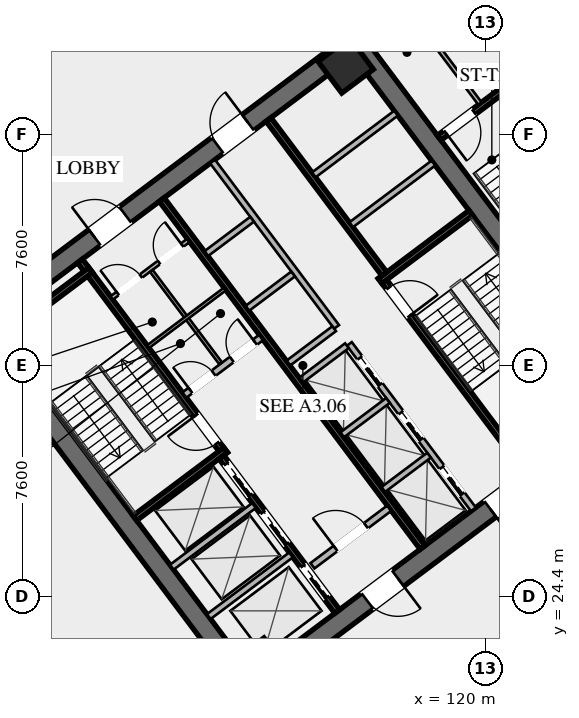
"""IFC4 building model, lengths in metres.
Left out: names, types, materials, properties, quantities, classifications, styles, units other than length and angle.
Written with IfcOpenShell. Run it as: python <this file> out.ifc"""

import sys

from ifc_helpers import new_model, si_unit, direction, frame, frame_2d, origin, origin_2d, place, context, subcontext, project, spatial, rectangle, hollow_rectangle, extrude, element, fill, save


model = new_model("IFC4")
c1 = context("Model", 3, precision=1e-05, world=origin(), true_north=direction((0.0, 1.0)))
c2 = subcontext(c1, "Body", "Model", "MODEL_VIEW")
j1 = project(units=[si_unit("LENGTHUNIT", "METRE"), si_unit("PLANEANGLEUNIT", "RADIAN")], contexts=[c1])
p1 = place(None, origin())
s1 = spatial("IfcSite", under=j1, at=p1, CompositionType="ELEMENT")
p2 = place(p1, origin())
s2 = spatial("IfcBuilding", under=s1, at=p2, CompositionType="ELEMENT")
p3 = place(p2, frame((0.0, 0.0, 15.6)))
s3 = spatial("IfcBuildingStorey", under=s2, at=p3, CompositionType="ELEMENT", Elevation=15.6)
for number, where, z_axis, x_axis in (
    (1, (112.476, 21.107, 0.0), (0.0, 0.0, 1.0), (-0.6, 0.8, 0.0)),
    (2, (115.524, 42.893, 0.0), (0.0, 0.0, 1.0), (0.6, -0.8, 0.0)),
):
    element("IfcWall", number, at=place(p3, frame(where, z_axis=z_axis, x_axis=x_axis)), inside=s3, PredefinedType="SHEAR", context=c2, shape_type="SweptSolid", body=[
        extrude(rectangle(XDim=15.6, YDim=0.65, at=frame_2d((7.8, 0.0))), origin(), (0.0, 0.0, 1.0), 4.2),
    ])
p4 = place(p3, frame((124.429, 30.478, 0.0), z_axis=(0.0, 0.0, 1.0), x_axis=(-0.799998028465, -0.600002628705, 0.0)))
e3 = element("IfcWall", 3, at=p4, inside=s3, PredefinedType="SHEAR", context=c2, shape_type="SweptSolid", body=[
    extrude(rectangle(XDim=14.86, YDim=0.65, at=frame_2d((7.43, 0.0))), origin(), (0.0, 0.0, 1.0), 4.2),
])
p5 = place(p4, frame((9.13, 0.0, 0.0)))
e4 = element("IfcOpeningElement", 4, at=p5, cuts=e3, PredefinedType="OPENING", context=c2, shape_type="SweptSolid", body=[
    extrude(rectangle(XDim=1.25, YDim=2.25, at=frame_2d((0.625, 1.125))), frame((0.0, 0.335, 0.0), z_axis=(0.0, -1.0, 0.0), x_axis=(1.0, 0.0, 0.0)), (0.0, 0.0, 1.0), 0.67),
])
p6 = place(p4, frame((4.08, 0.0, 0.0)))
e5 = element("IfcOpeningElement", 5, at=p6, cuts=e3, PredefinedType="OPENING", context=c2, shape_type="SweptSolid", body=[
    extrude(rectangle(XDim=1.25, YDim=2.25, at=frame_2d((0.625, 1.125))), frame((0.0, 0.335, 0.0), z_axis=(0.0, -1.0, 0.0), x_axis=(1.0, 0.0, 0.0)), (0.0, 0.0, 1.0), 0.67),
])
p7 = place(p3, frame((103.571, 33.522, 0.0), z_axis=(0.0, 0.0, 1.0), x_axis=(0.799998028465, 0.600002628705, 0.0)))
e6 = element("IfcWall", 6, at=p7, inside=s3, PredefinedType="SHEAR", context=c2, shape_type="SweptSolid", body=[
    extrude(rectangle(XDim=14.86, YDim=0.65, at=frame_2d((7.43, 0.0))), origin(), (0.0, 0.0, 1.0), 4.2),
])
p8 = place(p7, frame((4.48, 0.0, 0.0)))
e7 = element("IfcOpeningElement", 7, at=p8, cuts=e6, PredefinedType="OPENING", context=c2, shape_type="SweptSolid", body=[
    extrude(rectangle(XDim=1.25, YDim=2.25, at=frame_2d((0.625, 1.125))), frame((0.0, 0.335, 0.0), z_axis=(0.0, -1.0, 0.0), x_axis=(1.0, 0.0, 0.0)), (0.0, 0.0, 1.0), 0.67),
])
p9 = place(p7, frame((9.53, 0.0, 0.0)))
e8 = element("IfcOpeningElement", 8, at=p9, cuts=e6, PredefinedType="OPENING", context=c2, shape_type="SweptSolid", body=[
    extrude(rectangle(XDim=1.25, YDim=2.25, at=frame_2d((0.625, 1.125))), frame((0.0, 0.335, 0.0), z_axis=(0.0, -1.0, 0.0), x_axis=(1.0, 0.0, 0.0)), (0.0, 0.0, 1.0), 0.67),
])
p10 = place(p3, frame((115.41, 41.87, 0.0), z_axis=(0.0, 0.0, 1.0), x_axis=(0.799999996291, 0.600000004945, 0.0)))
e9 = element("IfcColumn", 9, at=p10, inside=s3, PredefinedType="COLUMN", context=c2, shape_type="SweptSolid", body=[
    extrude(hollow_rectangle(XDim=1.3, YDim=1.3, WallThickness=0.05, at=origin_2d()), origin(), (0.0, 0.0, 1.0), 3.9),
])
p11 = place(p3, frame((111.44, 29.08, 0.0), z_axis=(0.0, 0.0, 1.0), x_axis=(-0.600009827119, 0.799992629566, 0.0)))
e10 = element("IfcWall", 10, at=p11, inside=s3, PredefinedType="SHEAR", context=c2, shape_type="SweptSolid", body=[
    extrude(rectangle(XDim=7.95, YDim=0.2, at=frame_2d((3.975, 0.0))), origin(), (0.0, 0.0, 1.0), 3.9),
])
p12 = place(p11, frame((0.45, 0.0, 0.0)))
e11 = element("IfcOpeningElement", 11, at=p12, cuts=e10, PredefinedType="OPENING", context=c2, shape_type="SweptSolid", body=[
    extrude(rectangle(XDim=1.15, YDim=2.2, at=frame_2d((0.575, 1.1))), frame((0.0, 0.11, 0.0), z_axis=(0.0, -1.0, 0.0), x_axis=(1.0, 0.0, 0.0)), (0.0, 0.0, 1.0), 0.22),
])
for number, where, z_axis, x_axis in (
    (12, (108.476, 26.982, 0.0), (0.0, 0.0, 1.0), (0.8, 0.6, 0.0)),
    (13, (104.036, 32.902, 0.0), (0.0, 0.0, 1.0), (0.8, 0.6, 0.0)),
):
    element("IfcWall", number, at=place(p3, frame(where, z_axis=z_axis, x_axis=x_axis)), inside=s3, PredefinedType="SHEAR", context=c2, shape_type="SweptSolid", body=[
        extrude(rectangle(XDim=3.73, YDim=0.2, at=frame_2d((1.865, 0.0))), origin(), (0.0, 0.0, 1.0), 3.9),
    ])
p13 = place(p3, frame((116.56, 34.92, 0.0), z_axis=(0.0, 0.0, 1.0), x_axis=(0.600009827119, -0.799992629566, 0.0)))
e14 = element("IfcWall", 14, at=p13, inside=s3, PredefinedType="SHEAR", context=c2, shape_type="SweptSolid", body=[
    extrude(rectangle(XDim=7.95, YDim=0.2, at=frame_2d((3.975, 0.0))), origin(), (0.0, 0.0, 1.0), 3.9),
])
p14 = place(p13, frame((0.45, 0.0, 0.0)))
e15 = element("IfcOpeningElement", 15, at=p14, cuts=e14, PredefinedType="OPENING", context=c2, shape_type="SweptSolid", body=[
    extrude(rectangle(XDim=1.15, YDim=2.2, at=frame_2d((0.575, 1.1))), frame((0.0, 0.11, 0.0), z_axis=(0.0, -1.0, 0.0), x_axis=(1.0, 0.0, 0.0)), (0.0, 0.0, 1.0), 0.22),
])
p15 = place(p3, frame((116.54, 34.78, 0.0), z_axis=(0.0, 0.0, 1.0), x_axis=(0.799984290658, 0.600020945218, 0.0)))
e16 = element("IfcWall", 16, at=p15, inside=s3, PredefinedType="SHEAR", context=c2, shape_type="SweptSolid", body=[
    extrude(rectangle(XDim=3.73, YDim=0.2, at=frame_2d((1.865, 0.0))), origin(), (0.0, 0.0, 1.0), 3.9),
])
p16 = place(p3, frame((117.938, 26.016, 0.0), z_axis=(0.0, 0.0, 1.0), x_axis=(-0.600005463273, 0.799995902516, 0.0)))
e17 = element("IfcWall", 17, at=p16, inside=s3, PredefinedType="SHEAR", context=c2, shape_type="SweptSolid", body=[
    extrude(rectangle(XDim=14.3, YDim=0.2, at=frame_2d((7.15, 0.0))), origin(), (0.0, 0.0, 1.0), 3.9),
])
p17 = place(p3, frame((110.104, 31.028, 0.0), z_axis=(0.0, 0.0, 1.0), x_axis=(0.800018601094, 0.59997519774, 0.0)))
e18 = element("IfcWall", 18, at=p17, inside=s3, PredefinedType="SOLIDWALL", context=c2, shape_type="SweptSolid", body=[
    extrude(rectangle(XDim=3.15, YDim=0.22, at=frame_2d((1.575, 0.0))), origin(), (0.0, 0.0, 1.0), 2.943),
])
p18 = place(p17, frame((0.25, 0.0, 0.0)))
e19 = element("IfcOpeningElement", 19, at=p18, cuts=e18, PredefinedType="OPENING", context=c2, shape_type="SweptSolid", body=[
    extrude(rectangle(XDim=0.95, YDim=2.05, at=frame_2d((0.475, 1.025))), frame((0.0, 0.12, 0.0), z_axis=(0.0, -1.0, 0.0), x_axis=(1.0, 0.0, 0.0)), (0.0, 0.0, 1.0), 0.24),
])
p19 = place(p17, frame((1.95, 0.0, 0.0)))
e20 = element("IfcOpeningElement", 20, at=p19, cuts=e18, PredefinedType="OPENING", context=c2, shape_type="SweptSolid", body=[
    extrude(rectangle(XDim=0.95, YDim=2.05, at=frame_2d((0.475, 1.025))), frame((0.0, 0.12, 0.0), z_axis=(0.0, -1.0, 0.0), x_axis=(1.0, 0.0, 0.0)), (0.0, 0.0, 1.0), 0.24),
])
p20 = place(p3, frame((114.316, 25.412, 0.0), z_axis=(0.0, 0.0, 1.0), x_axis=(0.800018601094, 0.59997519774, 0.0)))
e21 = element("IfcWall", 21, at=p20, inside=s3, PredefinedType="SOLIDWALL", context=c2, shape_type="SweptSolid", body=[
    extrude(rectangle(XDim=3.15, YDim=0.22, at=frame_2d((1.575, 0.0))), origin(), (0.0, 0.0, 1.0), 2.943),
])
p21 = place(p20, frame((0.95, 0.0, 0.0)))
e22 = element("IfcOpeningElement", 22, at=p21, cuts=e21, PredefinedType="OPENING", context=c2, shape_type="SweptSolid", body=[
    extrude(rectangle(XDim=1.25, YDim=2.25, at=frame_2d((0.625, 1.125))), frame((0.0, 0.12, 0.0), z_axis=(0.0, -1.0, 0.0), x_axis=(1.0, 0.0, 0.0)), (0.0, 0.0, 1.0), 0.24),
])
p22 = place(p3, frame((115.13, 23.91, 0.0), z_axis=(0.0, 0.0, 1.0), x_axis=(-0.599975393228, 0.800018454488, 0.0)))
e23 = element("IfcWall", 23, at=p22, inside=s3, PredefinedType="SHEAR", context=c2, shape_type="SweptSolid", body=[
    extrude(rectangle(XDim=6.35, YDim=0.2, at=frame_2d((3.175, 0.0))), origin(), (0.0, 0.0, 1.0), 3.9),
])
p23 = place(p22, frame((4.775, 0.0, 0.0)))
e24 = element("IfcOpeningElement", 24, at=p23, cuts=e23, PredefinedType="OPENING", context=c2, shape_type="SweptSolid", body=[
    extrude(rectangle(XDim=1.3, YDim=2.25, at=frame_2d((0.65, 1.125))), frame((0.0, 0.11, 0.0), z_axis=(0.0, -1.0, 0.0), x_axis=(1.0, 0.0, 0.0)), (0.0, 0.0, 1.0), 0.22),
])
p24 = place(p22, frame((2.775, 0.0, 0.0)))
e25 = element("IfcOpeningElement", 25, at=p24, cuts=e23, PredefinedType="OPENING", context=c2, shape_type="SweptSolid", body=[
    extrude(rectangle(XDim=1.3, YDim=2.25, at=frame_2d((0.65, 1.125))), frame((0.0, 0.11, 0.0), z_axis=(0.0, -1.0, 0.0), x_axis=(1.0, 0.0, 0.0)), (0.0, 0.0, 1.0), 0.22),
])
p25 = place(p22, frame((0.575, 0.0, 0.0)))
e26 = element("IfcOpeningElement", 26, at=p25, cuts=e23, PredefinedType="OPENING", context=c2, shape_type="SweptSolid", body=[
    extrude(rectangle(XDim=1.3, YDim=2.25, at=frame_2d((0.65, 1.125))), frame((0.0, 0.11, 0.0), z_axis=(0.0, -1.0, 0.0), x_axis=(1.0, 0.0, 0.0)), (0.0, 0.0, 1.0), 0.22),
])
for number, where, z_axis, x_axis in (
    (27, (110.906, 23.742, 0.0), (0.0, 0.0, 1.0), (0.8, 0.6, 0.0)),
    (28, (109.688, 25.366, 0.0), (0.0, 0.0, 1.0), (0.8, 0.6, 0.0)),
):
    element("IfcWall", number, at=place(p3, frame(where, z_axis=z_axis, x_axis=x_axis)), inside=s3, PredefinedType="SOLIDWALL", context=c2, shape_type="SweptSolid", body=[
        extrude(rectangle(XDim=3.38, YDim=0.2, at=frame_2d((1.69, 0.0))), origin(), (0.0, 0.0, 1.0), 3.9),
    ])
p26 = place(p3, frame((112.87, 40.09, 0.0), z_axis=(0.0, 0.0, 1.0), x_axis=(0.599975393228, -0.800018454488, 0.0)))
e29 = element("IfcWall", 29, at=p26, inside=s3, PredefinedType="SHEAR", context=c2, shape_type="SweptSolid", body=[
    extrude(rectangle(XDim=6.35, YDim=0.2, at=frame_2d((3.175, 0.0))), origin(), (0.0, 0.0, 1.0), 3.9),
])
for number, where, z_axis, x_axis in (
    (30, (115.59, 36.63, 0.0), (0.0, 0.0, 1.0), (0.8, 0.6, 0.0)),
    (31, (114.36, 38.27, 0.0), (0.0, 0.0, 1.0), (0.8, 0.6, 0.0)),
):
    element("IfcWall", number, at=place(p3, frame(where, z_axis=z_axis, x_axis=x_axis)), inside=s3, PredefinedType="SOLIDWALL", context=c2, shape_type="SweptSolid", body=[
        extrude(rectangle(XDim=3.38, YDim=0.2, at=frame_2d((1.69, 0.0))), origin(), (0.0, 0.0, 1.0), 3.9),
    ])
p27 = place(p3, frame((107.71, 34.22, 0.0), z_axis=(0.0, 0.0, 1.0), x_axis=(0.799981399002, 0.60002480053, 0.0)))
e32 = element("IfcWall", 32, at=p27, inside=s3, PredefinedType="PARTITIONING", context=c2, shape_type="SweptSolid", body=[
    extrude(rectangle(XDim=3.15, YDim=0.135, at=frame_2d((1.575, 0.0))), origin(), (0.0, 0.0, 1.0), 2.943),
])
p28 = place(p27, frame((0.25, 0.0, 0.0)))
e33 = element("IfcOpeningElement", 33, at=p28, cuts=e32, PredefinedType="OPENING", context=c2, shape_type="SweptSolid", body=[
    extrude(rectangle(XDim=0.95, YDim=2.05, at=frame_2d((0.475, 1.025))), frame((0.0, 0.077, 0.0), z_axis=(0.0, -1.0, 0.0), x_axis=(1.0, 0.0, 0.0)), (0.0, 0.0, 1.0), 0.155),
])
p29 = place(p27, frame((1.95, 0.0, 0.0)))
e34 = element("IfcOpeningElement", 34, at=p29, cuts=e32, PredefinedType="OPENING", context=c2, shape_type="SweptSolid", body=[
    extrude(rectangle(XDim=0.95, YDim=2.05, at=frame_2d((0.475, 1.025))), frame((0.0, 0.077, 0.0), z_axis=(0.0, -1.0, 0.0), x_axis=(1.0, 0.0, 0.0)), (0.0, 0.0, 1.0), 0.155),
])
p30 = place(p3, frame((111.296, 32.072, 0.0), z_axis=(0.0, 0.0, 1.0), x_axis=(-0.59995887973, 0.800030838552, 0.0)))
e35 = element("IfcWall", 35, at=p30, inside=s3, PredefinedType="PARTITIONING", context=c2, shape_type="SweptSolid", body=[
    extrude(rectangle(XDim=3.8, YDim=0.11, at=frame_2d((1.9, 0.0))), origin(), (0.0, 0.0, 1.0), 2.943),
])
p31 = place(p3, frame((108.91, 32.62, 0.0), z_axis=(0.0, 0.0, 1.0), x_axis=(0.800018601094, 0.59997519774, 0.0)))
e36 = element("IfcWall", 36, at=p31, inside=s3, PredefinedType="PARTITIONING", context=c2, shape_type="SweptSolid", body=[
    extrude(rectangle(XDim=3.15, YDim=0.11, at=frame_2d((1.575, 0.0))), origin(), (0.0, 0.0, 1.0), 2.943),
])
p32 = place(p3, frame((119.61, 27.27, 0.0), z_axis=(0.0, 0.0, 1.0), x_axis=(-0.600011488909, 0.79999138319, 0.0)))
e37 = element("IfcWall", 37, at=p32, inside=s3, PredefinedType="SOLIDWALL", context=c2, shape_type="SweptSolid", body=[
    extrude(rectangle(XDim=6.8, YDim=0.2, at=frame_2d((3.4, 0.0))), origin(), (0.0, 0.0, 1.0), 3.9),
])
p33 = place(p32, frame((0.625, 0.0, 0.0)))
e38 = element("IfcOpeningElement", 38, at=p33, cuts=e37, PredefinedType="OPENING", context=c2, shape_type="SweptSolid", body=[
    extrude(rectangle(XDim=1.1, YDim=2.2, at=frame_2d((0.55, 1.1))), frame((0.0, 0.11, 0.0), z_axis=(0.0, -1.0, 0.0), x_axis=(1.0, 0.0, 0.0)), (0.0, 0.0, 1.0), 0.22),
])
p34 = place(p32, frame((2.875, 0.0, 0.0)))
e39 = element("IfcOpeningElement", 39, at=p34, cuts=e37, PredefinedType="OPENING", context=c2, shape_type="SweptSolid", body=[
    extrude(rectangle(XDim=1.1, YDim=2.2, at=frame_2d((0.55, 1.1))), frame((0.0, 0.11, 0.0), z_axis=(0.0, -1.0, 0.0), x_axis=(1.0, 0.0, 0.0)), (0.0, 0.0, 1.0), 0.22),
])
p35 = place(p32, frame((5.125, 0.0, 0.0)))
e40 = element("IfcOpeningElement", 40, at=p35, cuts=e37, PredefinedType="OPENING", context=c2, shape_type="SweptSolid", body=[
    extrude(rectangle(XDim=1.1, YDim=2.2, at=frame_2d((0.55, 1.1))), frame((0.0, 0.11, 0.0), z_axis=(0.0, -1.0, 0.0), x_axis=(1.0, 0.0, 0.0)), (0.0, 0.0, 1.0), 0.22),
])
p36 = place(p3, frame((116.646, 27.922, 0.0), z_axis=(0.0, 0.0, 1.0), x_axis=(0.8, 0.6, 0.0)))
e41 = element("IfcWall", 41, at=p36, inside=s3, PredefinedType="SOLIDWALL", context=c2, shape_type="SweptSolid", body=[
    extrude(rectangle(XDim=1.88, YDim=0.2, at=frame_2d((0.94, 0.0))), origin(), (0.0, 0.0, 1.0), 3.9),
])
p37 = place(p3, frame((115.296, 29.722, 0.0), z_axis=(0.0, 0.0, 1.0), x_axis=(0.799984418148, 0.600020775241, 0.0)))
e42 = element("IfcWall", 42, at=p37, inside=s3, PredefinedType="SOLIDWALL", context=c2, shape_type="SweptSolid", body=[
    extrude(rectangle(XDim=1.88, YDim=0.2, at=frame_2d((0.94, 0.0))), origin(), (0.0, 0.0, 1.0), 3.9),
])
p38 = place(p3, frame((113.946, 31.522, 0.0), z_axis=(0.0, 0.0, 1.0), x_axis=(0.8, 0.6, 0.0)))
e43 = element("IfcWall", 43, at=p38, inside=s3, PredefinedType="SOLIDWALL", context=c2, shape_type="SweptSolid", body=[
    extrude(rectangle(XDim=1.88, YDim=0.2, at=frame_2d((0.94, 0.0))), origin(), (0.0, 0.0, 1.0), 3.9),
])
p39 = place(p3, frame((115.11, 33.27, 0.0), z_axis=(0.0, 0.0, 1.0), x_axis=(-0.600011488909, 0.79999138319, 0.0)))
e44 = element("IfcWall", 44, at=p39, inside=s3, PredefinedType="SOLIDWALL", context=c2, shape_type="SweptSolid", body=[
    extrude(rectangle(XDim=6.8, YDim=0.2, at=frame_2d((3.4, 0.0))), origin(), (0.0, 0.0, 1.0), 3.9),
])
p40 = place(p3, frame((113.526, 32.082, 0.0), z_axis=(0.0, 0.0, 1.0), x_axis=(0.800046745961, 0.599937666993, 0.0)))
e45 = element("IfcWall", 45, at=p40, inside=s3, PredefinedType="SOLIDWALL", context=c2, shape_type="SweptSolid", body=[
    extrude(rectangle(XDim=1.88, YDim=0.2, at=frame_2d((0.94, 0.0))), origin(), (0.0, 0.0, 1.0), 3.9),
])
p41 = place(p3, frame((112.176, 33.882, 0.0), z_axis=(0.0, 0.0, 1.0), x_axis=(0.8, 0.6, 0.0)))
e46 = element("IfcWall", 46, at=p41, inside=s3, PredefinedType="SOLIDWALL", context=c2, shape_type="SweptSolid", body=[
    extrude(rectangle(XDim=1.88, YDim=0.2, at=frame_2d((0.94, 0.0))), origin(), (0.0, 0.0, 1.0), 3.9),
])
p42 = place(p3, frame((110.826, 35.682, 0.0), z_axis=(0.0, 0.0, 1.0), x_axis=(0.799984418148, 0.600020775241, 0.0)))
e47 = element("IfcWall", 47, at=p42, inside=s3, PredefinedType="SOLIDWALL", context=c2, shape_type="SweptSolid", body=[
    extrude(rectangle(XDim=1.88, YDim=0.2, at=frame_2d((0.94, 0.0))), origin(), (0.0, 0.0, 1.0), 3.9),
])
p43 = place(p3, frame((121.204, 41.528, 0.0), z_axis=(0.0, 0.0, 1.0), x_axis=(-0.800017232136, -0.599977023131, 0.0)))
e48 = element("IfcWall", 48, at=p43, inside=s3, PredefinedType="SHEAR", context=c2, shape_type="SweptSolid", body=[
    extrude(rectangle(XDim=3.4, YDim=0.2, at=frame_2d((1.7, 0.0))), origin(), (0.0, 0.0, 1.0), 3.9),
])
p44 = place(p43, frame((1.975, 0.0, 0.0)))
e49 = element("IfcOpeningElement", 49, at=p44, cuts=e48, PredefinedType="OPENING", context=c2, shape_type="SweptSolid", body=[
    extrude(rectangle(XDim=1.15, YDim=2.2, at=frame_2d((0.575, 1.1))), frame((0.0, 0.11, 0.0), z_axis=(0.0, -1.0, 0.0), x_axis=(1.0, 0.0, 0.0)), (0.0, 0.0, 1.0), 0.22),
])
p45 = place(p3, frame((119.824, 40.618, 0.0), z_axis=(0.0, 0.0, 1.0), x_axis=(-0.59999135767, 0.800006481675, 0.0)))
e50 = element("IfcWall", 50, at=p45, inside=s3, PredefinedType="PARTITIONING", context=c2, shape_type="SweptSolid", body=[
    extrude(rectangle(XDim=4.52, YDim=0.135, at=frame_2d((2.26, 0.0))), origin(), (0.0, 0.0, 1.0), 2.943),
])
p46 = place(p8, origin())
e51 = element("IfcDoor", 51, at=p46, inside=s3, OperationType="SINGLE_SWING_LEFT", PredefinedType="DOOR", context=c2, shape_type="SweptSolid", body=[
    extrude(rectangle(XDim=1.25, YDim=2.25, at=frame_2d((0.625, 1.125))), frame((0.0, 0.025, 0.0), z_axis=(0.0, -1.0, 0.0), x_axis=(1.0, 0.0, 0.0)), (0.0, 0.0, 1.0), 0.05),
])
fill(e7, e51)
p47 = place(p9, origin())
e52 = element("IfcDoor", 52, at=p47, inside=s3, OperationType="SINGLE_SWING_RIGHT", PredefinedType="DOOR", context=c2, shape_type="SweptSolid", body=[
    extrude(rectangle(XDim=1.25, YDim=2.25, at=frame_2d((0.625, 1.125))), frame((0.0, 0.025, 0.0), z_axis=(0.0, -1.0, 0.0), x_axis=(1.0, 0.0, 0.0)), (0.0, 0.0, 1.0), 0.05),
])
fill(e8, e52)
p48 = place(p5, origin())
e53 = element("IfcDoor", 53, at=p48, inside=s3, OperationType="SINGLE_SWING_LEFT", PredefinedType="DOOR", context=c2, shape_type="SweptSolid", body=[
    extrude(rectangle(XDim=1.25, YDim=2.25, at=frame_2d((0.625, 1.125))), frame((0.0, 0.025, 0.0), z_axis=(0.0, -1.0, 0.0), x_axis=(1.0, 0.0, 0.0)), (0.0, 0.0, 1.0), 0.05),
])
fill(e4, e53)
p49 = place(p6, origin())
e54 = element("IfcDoor", 54, at=p49, inside=s3, OperationType="SINGLE_SWING_RIGHT", PredefinedType="DOOR", context=c2, shape_type="SweptSolid", body=[
    extrude(rectangle(XDim=1.25, YDim=2.25, at=frame_2d((0.625, 1.125))), frame((0.0, 0.025, 0.0), z_axis=(0.0, -1.0, 0.0), x_axis=(1.0, 0.0, 0.0)), (0.0, 0.0, 1.0), 0.05),
])
fill(e5, e54)
p50 = place(p12, origin())
e55 = element("IfcDoor", 55, at=p50, inside=s3, OperationType="SINGLE_SWING_RIGHT", PredefinedType="DOOR", context=c2, shape_type="SweptSolid", body=[
    extrude(rectangle(XDim=1.15, YDim=2.2, at=frame_2d((0.575, 1.1))), frame((0.0, 0.025, 0.0), z_axis=(0.0, -1.0, 0.0), x_axis=(1.0, 0.0, 0.0)), (0.0, 0.0, 1.0), 0.05),
])
fill(e11, e55)
p51 = place(p14, origin())
e56 = element("IfcDoor", 56, at=p51, inside=s3, OperationType="SINGLE_SWING_RIGHT", PredefinedType="DOOR", context=c2, shape_type="SweptSolid", body=[
    extrude(rectangle(XDim=1.15, YDim=2.2, at=frame_2d((0.575, 1.1))), frame((0.0, 0.025, 0.0), z_axis=(0.0, -1.0, 0.0), x_axis=(1.0, 0.0, 0.0)), (0.0, 0.0, 1.0), 0.05),
])
fill(e15, e56)
p52 = place(p21, origin())
e57 = element("IfcDoor", 57, at=p52, inside=s3, OperationType="SINGLE_SWING_LEFT", PredefinedType="DOOR", context=c2, shape_type="SweptSolid", body=[
    extrude(rectangle(XDim=1.25, YDim=2.25, at=frame_2d((0.625, 1.125))), frame((0.0, 0.025, 0.0), z_axis=(0.0, -1.0, 0.0), x_axis=(1.0, 0.0, 0.0)), (0.0, 0.0, 1.0), 0.05),
])
fill(e22, e57)
p53 = place(p28, origin())
e58 = element("IfcDoor", 58, at=p53, inside=s3, OperationType="SINGLE_SWING_LEFT", PredefinedType="DOOR", context=c2, shape_type="SweptSolid", body=[
    extrude(rectangle(XDim=0.95, YDim=2.05, at=frame_2d((0.475, 1.025))), frame((0.0, 0.025, 0.0), z_axis=(0.0, -1.0, 0.0), x_axis=(1.0, 0.0, 0.0)), (0.0, 0.0, 1.0), 0.05),
])
fill(e33, e58)
p54 = place(p29, origin())
e59 = element("IfcDoor", 59, at=p54, inside=s3, OperationType="SINGLE_SWING_RIGHT", PredefinedType="DOOR", context=c2, shape_type="SweptSolid", body=[
    extrude(rectangle(XDim=0.95, YDim=2.05, at=frame_2d((0.475, 1.025))), frame((0.0, 0.025, 0.0), z_axis=(0.0, -1.0, 0.0), x_axis=(1.0, 0.0, 0.0)), (0.0, 0.0, 1.0), 0.05),
])
fill(e34, e59)
p55 = place(p18, origin())
e60 = element("IfcDoor", 60, at=p55, inside=s3, OperationType="SINGLE_SWING_LEFT", PredefinedType="DOOR", context=c2, shape_type="SweptSolid", body=[
    extrude(rectangle(XDim=0.95, YDim=2.05, at=frame_2d((0.475, 1.025))), frame((0.0, 0.025, 0.0), z_axis=(0.0, -1.0, 0.0), x_axis=(1.0, 0.0, 0.0)), (0.0, 0.0, 1.0), 0.05),
])
fill(e19, e60)
p56 = place(p19, origin())
e61 = element("IfcDoor", 61, at=p56, inside=s3, OperationType="SINGLE_SWING_RIGHT", PredefinedType="DOOR", context=c2, shape_type="SweptSolid", body=[
    extrude(rectangle(XDim=0.95, YDim=2.05, at=frame_2d((0.475, 1.025))), frame((0.0, 0.025, 0.0), z_axis=(0.0, -1.0, 0.0), x_axis=(1.0, 0.0, 0.0)), (0.0, 0.0, 1.0), 0.05),
])
fill(e20, e61)
p57 = place(p44, origin())
e62 = element("IfcDoor", 62, at=p57, inside=s3, OperationType="SINGLE_SWING_RIGHT", PredefinedType="DOOR", context=c2, shape_type="SweptSolid", body=[
    extrude(rectangle(XDim=1.15, YDim=2.2, at=frame_2d((0.575, 1.1))), frame((0.0, 0.025, 0.0), z_axis=(0.0, -1.0, 0.0), x_axis=(1.0, 0.0, 0.0)), (0.0, 0.0, 1.0), 0.05),
])
fill(e49, e62)
p58 = place(p23, origin())
e63 = element("IfcDoor", 63, at=p58, inside=s3, OperationType="SLIDING_TO_LEFT", PredefinedType="DOOR", context=c2, shape_type="SweptSolid", body=[
    extrude(rectangle(XDim=1.3, YDim=2.25, at=frame_2d((0.65, 1.125))), frame((0.0, 0.025, 0.0), z_axis=(0.0, -1.0, 0.0), x_axis=(1.0, 0.0, 0.0)), (0.0, 0.0, 1.0), 0.05),
])
fill(e24, e63)
p59 = place(p24, origin())
e64 = element("IfcDoor", 64, at=p59, inside=s3, OperationType="SLIDING_TO_LEFT", PredefinedType="DOOR", context=c2, shape_type="SweptSolid", body=[
    extrude(rectangle(XDim=1.3, YDim=2.25, at=frame_2d((0.65, 1.125))), frame((0.0, 0.025, 0.0), z_axis=(0.0, -1.0, 0.0), x_axis=(1.0, 0.0, 0.0)), (0.0, 0.0, 1.0), 0.05),
])
fill(e25, e64)
p60 = place(p25, origin())
e65 = element("IfcDoor", 65, at=p60, inside=s3, OperationType="SLIDING_TO_LEFT", PredefinedType="DOOR", context=c2, shape_type="SweptSolid", body=[
    extrude(rectangle(XDim=1.3, YDim=2.25, at=frame_2d((0.65, 1.125))), frame((0.0, 0.025, 0.0), z_axis=(0.0, -1.0, 0.0), x_axis=(1.0, 0.0, 0.0)), (0.0, 0.0, 1.0), 0.05),
])
fill(e26, e65)
p61 = place(p33, origin())
e66 = element("IfcDoor", 66, at=p61, inside=s3, OperationType="SLIDING_TO_LEFT", PredefinedType="DOOR", context=c2, shape_type="SweptSolid", body=[
    extrude(rectangle(XDim=1.1, YDim=2.2, at=frame_2d((0.55, 1.1))), frame((0.0, 0.025, 0.0), z_axis=(0.0, -1.0, 0.0), x_axis=(1.0, 0.0, 0.0)), (0.0, 0.0, 1.0), 0.05),
])
fill(e38, e66)
p62 = place(p34, origin())
e67 = element("IfcDoor", 67, at=p62, inside=s3, OperationType="SLIDING_TO_LEFT", PredefinedType="DOOR", context=c2, shape_type="SweptSolid", body=[
    extrude(rectangle(XDim=1.1, YDim=2.2, at=frame_2d((0.55, 1.1))), frame((0.0, 0.025, 0.0), z_axis=(0.0, -1.0, 0.0), x_axis=(1.0, 0.0, 0.0)), (0.0, 0.0, 1.0), 0.05),
])
fill(e39, e67)
p63 = place(p35, origin())
e68 = element("IfcDoor", 68, at=p63, inside=s3, OperationType="SLIDING_TO_LEFT", PredefinedType="DOOR", context=c2, shape_type="SweptSolid", body=[
    extrude(rectangle(XDim=1.1, YDim=2.2, at=frame_2d((0.55, 1.1))), frame((0.0, 0.025, 0.0), z_axis=(0.0, -1.0, 0.0), x_axis=(1.0, 0.0, 0.0)), (0.0, 0.0, 1.0), 0.05),
])
fill(e40, e68)
save(model, sys.argv[1])
